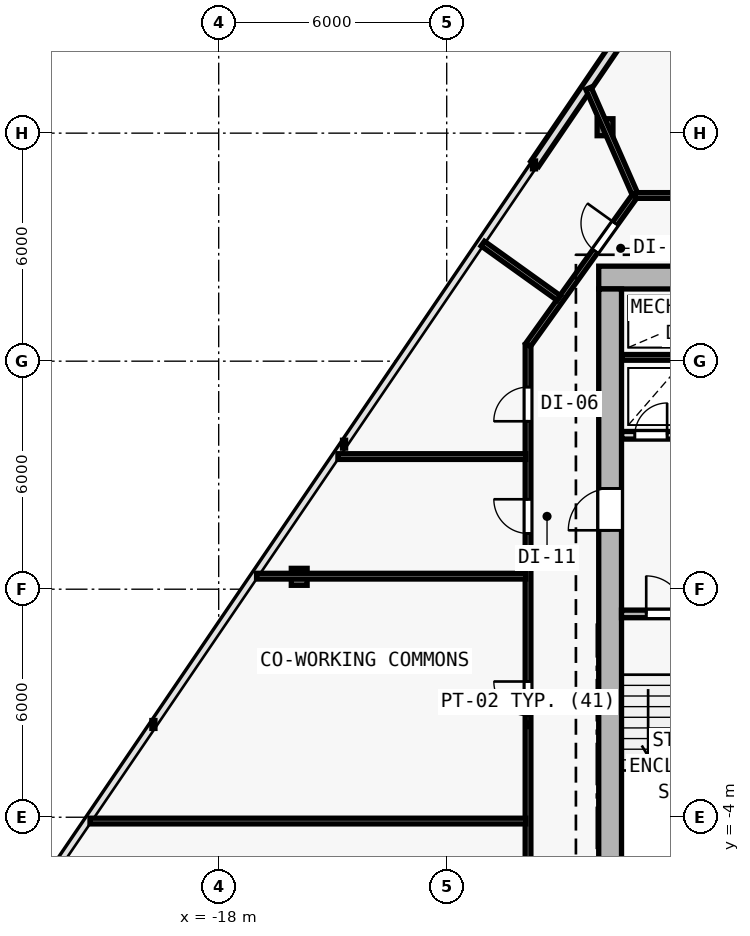
"""IFC4 building model, lengths in metres.
Left out: names, types, materials, properties, quantities, classifications, styles, units other than length and angle.
Written with IfcOpenShell. Run it as: python <this file> out.ifc"""

import sys

from ifc_helpers import new_model, si_unit, direction, frame, frame_2d, origin, origin_2d, place, context, subcontext, project, spatial, rectangle, i_section, extrude, element, fill, save


model = new_model("IFC4")
c1 = context("Model", 3, precision=1e-05, world=origin(), true_north=direction((0.0, 1.0)))
c2 = subcontext(c1, "Body", "Model", "MODEL_VIEW")
j1 = project(units=[si_unit("LENGTHUNIT", "METRE"), si_unit("PLANEANGLEUNIT", "RADIAN")], contexts=[c1])
p1 = place(None, origin())
s1 = spatial("IfcSite", under=j1, at=p1, CompositionType="ELEMENT")
p2 = place(p1, origin())
s2 = spatial("IfcBuilding", under=s1, at=p2, CompositionType="ELEMENT")
p3 = place(p2, frame((0.0, 0.0, 44.4)))
s3 = spatial("IfcBuildingStorey", under=s2, at=p3, CompositionType="ELEMENT", Elevation=44.4)
for number, where, z_axis, x_axis in (
    (1, (-7.7, 10.2, 0.0), (0.0, 0.0, 1.0), (1.0, 0.0, 0.0)),
    (2, (-7.7, 2.0, 0.0), (0.0, 0.0, 1.0), (1.0, 0.0, 0.0)),
):
    element("IfcColumn", number, at=place(p3, frame(where, z_axis=z_axis, x_axis=x_axis)), inside=s3, PredefinedType="COLUMN", context=c2, shape_type="SweptSolid", body=[
        extrude(i_section(OverallWidth=0.416, OverallDepth=0.446, WebThickness=0.025, FlangeThickness=0.04, FilletRadius=0.015, at=origin_2d()), origin(), (0.0, 0.0, 1.0), 3.6),
    ])
p4 = place(p3, frame((-7.833, 14.156, 0.006), z_axis=(0.008775143007, -0.002584925847, 0.999958156636), x_axis=(0.282568886397, 0.959247009086, 0.0)))
e3 = element("IfcColumn", 3, at=p4, inside=s3, PredefinedType="COLUMN", context=c2, shape_type="SweptSolid", body=[
    extrude(i_section(OverallWidth=0.416, OverallDepth=0.446, WebThickness=0.025, FlangeThickness=0.04, FilletRadius=0.015, at=origin_2d()), origin(), (0.0, 0.0, 1.0), 3.589),
])
p5 = place(p3, frame((-15.881, 2.326, 0.006), z_axis=(0.017003561856, 0.009590008887, 0.99980943715), x_axis=(-0.491253415567, 0.871016694268, 0.0)))
e4 = element("IfcColumn", 4, at=p5, inside=s3, PredefinedType="COLUMN", context=c2, shape_type="SweptSolid", body=[
    extrude(i_section(OverallWidth=0.416, OverallDepth=0.446, WebThickness=0.025, FlangeThickness=0.04, FilletRadius=0.015, at=origin_2d()), origin(), (0.0, 0.0, 1.0), 3.59),
])
p6 = place(p3, frame((-9.684, 13.191, 0.0), z_axis=(0.0, 0.0, 1.0), x_axis=(0.562473549685, 0.826815279192, 0.0)))
e5 = element("IfcWall", 5, at=p6, inside=s3, PredefinedType="SOLIDWALL", context=c2, shape_type="SweptSolid", body=[
    extrude(rectangle(XDim=12.536, YDim=0.25, at=frame_2d((6.268, 0.0))), origin(), (0.0, 0.0, 1.0), 3.35),
])
p7 = place(p6, frame((5.818, 0.0, 0.62)))
e6 = element("IfcOpeningElement", 6, at=p7, cuts=e5, PredefinedType="OPENING", context=c2, shape_type="SweptSolid", body=[
    extrude(rectangle(XDim=0.9, YDim=1.6, at=frame_2d((0.45, 0.8))), frame((0.0, 0.135, 0.0), z_axis=(0.0, -1.0, 0.0), x_axis=(1.0, 0.0, 0.0)), (0.0, 0.0, 1.0), 0.27),
])
p8 = place(p3, frame((8.0, 10.2, 0.0), z_axis=(0.0, 0.0, 1.0), x_axis=(-1.0, 0.0, 0.0)))
e7 = element("IfcWall", 7, at=p8, inside=s3, PredefinedType="SHEAR", context=c2, shape_type="SweptSolid", body=[
    extrude(rectangle(XDim=16.0, YDim=0.6, at=frame_2d((8.0, 0.0))), origin(), (0.0, 0.0, 1.0), 3.35),
])
p9 = place(p8, frame((4.45, 0.0, 0.0)))
e8 = element("IfcOpeningElement", 8, at=p9, cuts=e7, PredefinedType="OPENING", context=c2, shape_type="SweptSolid", body=[
    extrude(rectangle(XDim=1.1, YDim=2.15, at=frame_2d((0.55, 1.075))), frame((0.0, 0.31, 0.0), z_axis=(0.0, -1.0, 0.0), x_axis=(1.0, 0.0, 0.0)), (0.0, 0.0, 1.0), 0.62),
])
p10 = place(p3, frame((-7.7, -9.1, 0.0), z_axis=(0.0, 0.0, 1.0), x_axis=(0.0, 1.0, 0.0)))
e9 = element("IfcWall", 9, at=p10, inside=s3, PredefinedType="SHEAR", context=c2, shape_type="SweptSolid", body=[
    extrude(rectangle(XDim=19.0, YDim=0.6, at=frame_2d((9.5, 0.0))), origin(), (0.0, 0.0, 1.0), 3.35),
])
p11 = place(p10, frame((12.65, 0.0, 0.0)))
e10 = element("IfcOpeningElement", 10, at=p11, cuts=e9, PredefinedType="OPENING", context=c2, shape_type="SweptSolid", body=[
    extrude(rectangle(XDim=1.1, YDim=2.15, at=frame_2d((0.55, 1.075))), frame((0.0, 0.31, 0.0), z_axis=(0.0, -1.0, 0.0), x_axis=(1.0, 0.0, 0.0)), (0.0, 0.0, 1.0), 0.62),
])
p12 = place(p3, frame((-7.4, 1.35, 0.0), z_axis=(0.0, 0.0, 1.0), x_axis=(1.0, 0.0, 0.0)))
e11 = element("IfcWall", 11, at=p12, inside=s3, PredefinedType="SOLIDWALL", context=c2, shape_type="SweptSolid", body=[
    extrude(rectangle(XDim=3.35, YDim=0.2, at=frame_2d((1.675, 0.0))), origin(), (0.0, 0.0, 1.0), 3.35),
])
p13 = place(p12, frame((0.65, 0.0, 0.0)))
e12 = element("IfcOpeningElement", 12, at=p13, cuts=e11, PredefinedType="OPENING", context=c2, shape_type="SweptSolid", body=[
    extrude(rectangle(XDim=1.0, YDim=2.15, at=frame_2d((0.5, 1.075))), frame((0.0, 0.11, 0.0), z_axis=(0.0, -1.0, 0.0), x_axis=(1.0, 0.0, 0.0)), (0.0, 0.0, 1.0), 0.22),
])
p14 = place(p3, frame((-7.395, 6.05, 0.0), z_axis=(0.0, 0.0, 1.0), x_axis=(1.0, 0.0, 0.0)))
e13 = element("IfcWall", 13, at=p14, inside=s3, PredefinedType="SOLIDWALL", context=c2, shape_type="SweptSolid", body=[
    extrude(rectangle(XDim=3.545, YDim=0.2, at=frame_2d((1.772, 0.0))), origin(), (0.0, 0.0, 1.0), 3.35),
])
p15 = place(p14, frame((0.345, 0.0, 0.0)))
e14 = element("IfcOpeningElement", 14, at=p15, cuts=e13, PredefinedType="OPENING", context=c2, shape_type="SweptSolid", body=[
    extrude(rectangle(XDim=0.85, YDim=2.1, at=frame_2d((0.425, 1.05))), frame((0.0, 0.11, 0.0), z_axis=(0.0, -1.0, 0.0), x_axis=(1.0, 0.0, 0.0)), (0.0, 0.0, 1.0), 0.22),
])
p16 = place(p14, frame((2.145, 0.0, 0.0)))
e15 = element("IfcOpeningElement", 15, at=p16, cuts=e13, PredefinedType="OPENING", context=c2, shape_type="SweptSolid", body=[
    extrude(rectangle(XDim=0.85, YDim=2.1, at=frame_2d((0.425, 1.05))), frame((0.0, 0.11, 0.0), z_axis=(0.0, -1.0, 0.0), x_axis=(1.0, 0.0, 0.0)), (0.0, 0.0, 1.0), 0.22),
])
p17 = place(p3, frame((-7.395, 8.1, 0.0), z_axis=(0.0, 0.0, 1.0), x_axis=(1.0, 0.0, 0.0)))
e16 = element("IfcWall", 16, at=p17, inside=s3, PredefinedType="PARTITIONING", context=c2, shape_type="SweptSolid", body=[
    extrude(rectangle(XDim=3.545, YDim=0.15, at=frame_2d((1.772, 0.0))), origin(), (0.0, 0.0, 1.0), 3.35),
])
p18 = place(p3, frame((-9.86, -11.56, 0.0), z_axis=(0.0, 0.0, 1.0), x_axis=(0.0, 1.0, 0.0)))
e17 = element("IfcWall", 17, at=p18, inside=s3, PredefinedType="PARTITIONING", context=c2, shape_type="SweptSolid", body=[
    extrude(rectangle(XDim=19.986, YDim=0.15, at=frame_2d((9.993, 0.0))), origin(), (0.0, 0.0, 1.0), 2.609),
])
p19 = place(p18, frame((10.231, 0.0, 0.0)))
e18 = element("IfcOpeningElement", 18, at=p19, cuts=e17, PredefinedType="OPENING", context=c2, shape_type="SweptSolid", body=[
    extrude(rectangle(XDim=0.9, YDim=2.1, at=frame_2d((0.45, 1.05))), frame((0.0, 0.085, 0.0), z_axis=(0.0, -1.0, 0.0), x_axis=(1.0, 0.0, 0.0)), (0.0, 0.0, 1.0), 0.17),
])
p20 = place(p18, frame((3.369, 0.0, 0.0)))
e19 = element("IfcOpeningElement", 19, at=p20, cuts=e17, PredefinedType="OPENING", context=c2, shape_type="SweptSolid", body=[
    extrude(rectangle(XDim=0.9, YDim=2.1, at=frame_2d((0.45, 1.05))), frame((0.0, 0.085, 0.0), z_axis=(0.0, -1.0, 0.0), x_axis=(1.0, 0.0, 0.0)), (0.0, 0.0, 1.0), 0.17),
])
p21 = place(p18, frame((17.979, 0.0, 0.0)))
e20 = element("IfcOpeningElement", 20, at=p21, cuts=e17, PredefinedType="OPENING", context=c2, shape_type="SweptSolid", body=[
    extrude(rectangle(XDim=0.9, YDim=2.1, at=frame_2d((0.45, 1.05))), frame((0.0, 0.085, 0.0), z_axis=(0.0, -1.0, 0.0), x_axis=(1.0, 0.0, 0.0)), (0.0, 0.0, 1.0), 0.17),
])
p22 = place(p18, frame((15.027, 0.0, 0.0)))
e21 = element("IfcOpeningElement", 21, at=p22, cuts=e17, PredefinedType="OPENING", context=c2, shape_type="SweptSolid", body=[
    extrude(rectangle(XDim=0.9, YDim=2.1, at=frame_2d((0.45, 1.05))), frame((0.0, 0.085, 0.0), z_axis=(0.0, -1.0, 0.0), x_axis=(1.0, 0.0, 0.0)), (0.0, 0.0, 1.0), 0.17),
])
p23 = place(p3, frame((-9.86, 8.426, 0.0), z_axis=(0.0, 0.0, 1.0), x_axis=(0.582449511476, 0.812866881218, 0.0)))
e22 = element("IfcWall", 22, at=p23, inside=s3, PredefinedType="PARTITIONING", context=c2, shape_type="SweptSolid", body=[
    extrude(rectangle(XDim=4.84, YDim=0.15, at=frame_2d((2.42, 0.0))), origin(), (0.0, 0.0, 1.0), 2.725),
])
p24 = place(p23, frame((3.038, 0.0, 0.0)))
e23 = element("IfcOpeningElement", 23, at=p24, cuts=e22, PredefinedType="OPENING", context=c2, shape_type="SweptSolid", body=[
    extrude(rectangle(XDim=0.9, YDim=2.1, at=frame_2d((0.45, 1.05))), frame((0.0, 0.085, 0.0), z_axis=(0.0, -1.0, 0.0), x_axis=(1.0, 0.0, 0.0)), (0.0, 0.0, 1.0), 0.17),
])
p25 = place(p3, frame((-7.041, 12.36, 0.0), z_axis=(0.0, 0.0, 1.0), x_axis=(1.0, 0.0, 0.0)))
e24 = element("IfcWall", 24, at=p25, inside=s3, PredefinedType="PARTITIONING", context=c2, shape_type="SweptSolid", body=[
    extrude(rectangle(XDim=14.082, YDim=0.15, at=frame_2d((7.041, 0.0))), origin(), (0.0, 0.0, 1.0), 3.35),
])
p26 = place(p25, frame((6.591, 0.0, 0.0)))
e25 = element("IfcOpeningElement", 25, at=p26, cuts=e24, PredefinedType="OPENING", context=c2, shape_type="SweptSolid", body=[
    extrude(rectangle(XDim=0.9, YDim=2.1, at=frame_2d((0.45, 1.05))), frame((0.0, 0.085, 0.0), z_axis=(0.0, -1.0, 0.0), x_axis=(1.0, 0.0, 0.0)), (0.0, 0.0, 1.0), 0.17),
])
p27 = place(p3, frame((-7.052, 12.41, 0.0), z_axis=(0.0, 0.0, 1.0), x_axis=(-0.402722392978, 0.915322169618, 0.0)))
e26 = element("IfcWall", 26, at=p27, inside=s3, PredefinedType="PARTITIONING", context=c2, shape_type="SweptSolid", body=[
    extrude(rectangle(XDim=3.026, YDim=0.15, at=frame_2d((1.513, 0.0))), origin(), (0.0, 0.0, 1.0), 2.725),
])
p28 = place(p3, frame((-9.92, 2.343, 0.0), z_axis=(0.0, 0.0, 1.0), x_axis=(-1.0, 0.0, 0.0)))
e27 = element("IfcWall", 27, at=p28, inside=s3, PredefinedType="PARTITIONING", context=c2, shape_type="SweptSolid", body=[
    extrude(rectangle(XDim=7.083, YDim=0.15, at=frame_2d((3.542, 0.0))), origin(), (0.0, 0.0, 1.0), 2.725),
])
p29 = place(p3, frame((-9.05, 9.66, 0.0), z_axis=(0.0, 0.0, 1.0), x_axis=(-0.812868003182, 0.58244794566, 0.0)))
e28 = element("IfcWall", 28, at=p29, inside=s3, PredefinedType="PARTITIONING", context=c2, shape_type="SweptSolid", body=[
    extrude(rectangle(XDim=2.461, YDim=0.15, at=frame_2d((1.231, 0.0))), origin(), (0.0, 0.0, 1.0), 2.735),
])
p30 = place(p3, frame((-9.92, -4.1, 0.0), z_axis=(0.0, 0.0, 1.0), x_axis=(-1.0, 0.0, 0.0)))
e29 = element("IfcWall", 29, at=p30, inside=s3, PredefinedType="PARTITIONING", context=c2, shape_type="SweptSolid", body=[
    extrude(rectangle(XDim=11.467, YDim=0.15, at=frame_2d((5.733, 0.0))), origin(), (0.0, 0.0, 1.0), 2.735),
])
p31 = place(p3, frame((-9.92, 5.49, 0.0), z_axis=(0.0, 0.0, 1.0), x_axis=(-1.0, 0.0, 0.0)))
e30 = element("IfcWall", 30, at=p31, inside=s3, PredefinedType="PARTITIONING", context=c2, shape_type="SweptSolid", body=[
    extrude(rectangle(XDim=4.942, YDim=0.15, at=frame_2d((2.471, 0.0))), origin(), (0.0, 0.0, 1.0), 2.735),
])
p32 = place(p11, origin())
e31 = element("IfcDoor", 31, at=p32, inside=s3, OperationType="SINGLE_SWING_LEFT", PredefinedType="DOOR", context=c2, shape_type="SweptSolid", body=[
    extrude(rectangle(XDim=1.1, YDim=2.15, at=frame_2d((0.55, 1.075))), frame((0.0, 0.025, 0.0), z_axis=(0.0, -1.0, 0.0), x_axis=(1.0, 0.0, 0.0)), (0.0, 0.0, 1.0), 0.05),
])
fill(e10, e31)
p33 = place(p13, origin())
e32 = element("IfcDoor", 32, at=p33, inside=s3, OperationType="SINGLE_SWING_LEFT", PredefinedType="DOOR", context=c2, shape_type="SweptSolid", body=[
    extrude(rectangle(XDim=1.0, YDim=2.15, at=frame_2d((0.5, 1.075))), frame((0.0, 0.025, 0.0), z_axis=(0.0, -1.0, 0.0), x_axis=(1.0, 0.0, 0.0)), (0.0, 0.0, 1.0), 0.05),
])
fill(e12, e32)
p34 = place(p15, origin())
e33 = element("IfcDoor", 33, at=p34, inside=s3, OperationType="SINGLE_SWING_RIGHT", PredefinedType="DOOR", context=c2, shape_type="SweptSolid", body=[
    extrude(rectangle(XDim=0.85, YDim=2.1, at=frame_2d((0.425, 1.05))), frame((0.0, 0.025, 0.0), z_axis=(0.0, -1.0, 0.0), x_axis=(1.0, 0.0, 0.0)), (0.0, 0.0, 1.0), 0.05),
])
fill(e14, e33)
p35 = place(p19, origin())
e34 = element("IfcDoor", 34, at=p35, inside=s3, OperationType="SINGLE_SWING_RIGHT", PredefinedType="DOOR", context=c2, shape_type="SweptSolid", body=[
    extrude(rectangle(XDim=0.9, YDim=2.1, at=frame_2d((0.45, 1.05))), frame((0.0, 0.025, 0.0), z_axis=(0.0, -1.0, 0.0), x_axis=(1.0, 0.0, 0.0)), (0.0, 0.0, 1.0), 0.05),
])
fill(e18, e34)
p36 = place(p24, origin())
e35 = element("IfcDoor", 35, at=p36, inside=s3, OperationType="SINGLE_SWING_RIGHT", PredefinedType="DOOR", context=c2, shape_type="SweptSolid", body=[
    extrude(rectangle(XDim=0.9, YDim=2.1, at=frame_2d((0.45, 1.05))), frame((0.0, 0.025, 0.0), z_axis=(0.0, -1.0, 0.0), x_axis=(1.0, 0.0, 0.0)), (0.0, 0.0, 1.0), 0.05),
])
fill(e23, e35)
p37 = place(p21, origin())
e36 = element("IfcDoor", 36, at=p37, inside=s3, OperationType="SINGLE_SWING_LEFT", PredefinedType="DOOR", context=c2, shape_type="SweptSolid", body=[
    extrude(rectangle(XDim=0.9, YDim=2.1, at=frame_2d((0.45, 1.05))), frame((0.0, 0.025, 0.0), z_axis=(0.0, -1.0, 0.0), x_axis=(1.0, 0.0, 0.0)), (0.0, 0.0, 1.0), 0.05),
])
fill(e20, e36)
p38 = place(p22, origin())
e37 = element("IfcDoor", 37, at=p38, inside=s3, OperationType="SINGLE_SWING_RIGHT", PredefinedType="DOOR", context=c2, shape_type="SweptSolid", body=[
    extrude(rectangle(XDim=0.9, YDim=2.1, at=frame_2d((0.45, 1.05))), frame((0.0, 0.025, 0.0), z_axis=(0.0, -1.0, 0.0), x_axis=(1.0, 0.0, 0.0)), (0.0, 0.0, 1.0), 0.05),
])
fill(e21, e37)
save(model, sys.argv[1])
